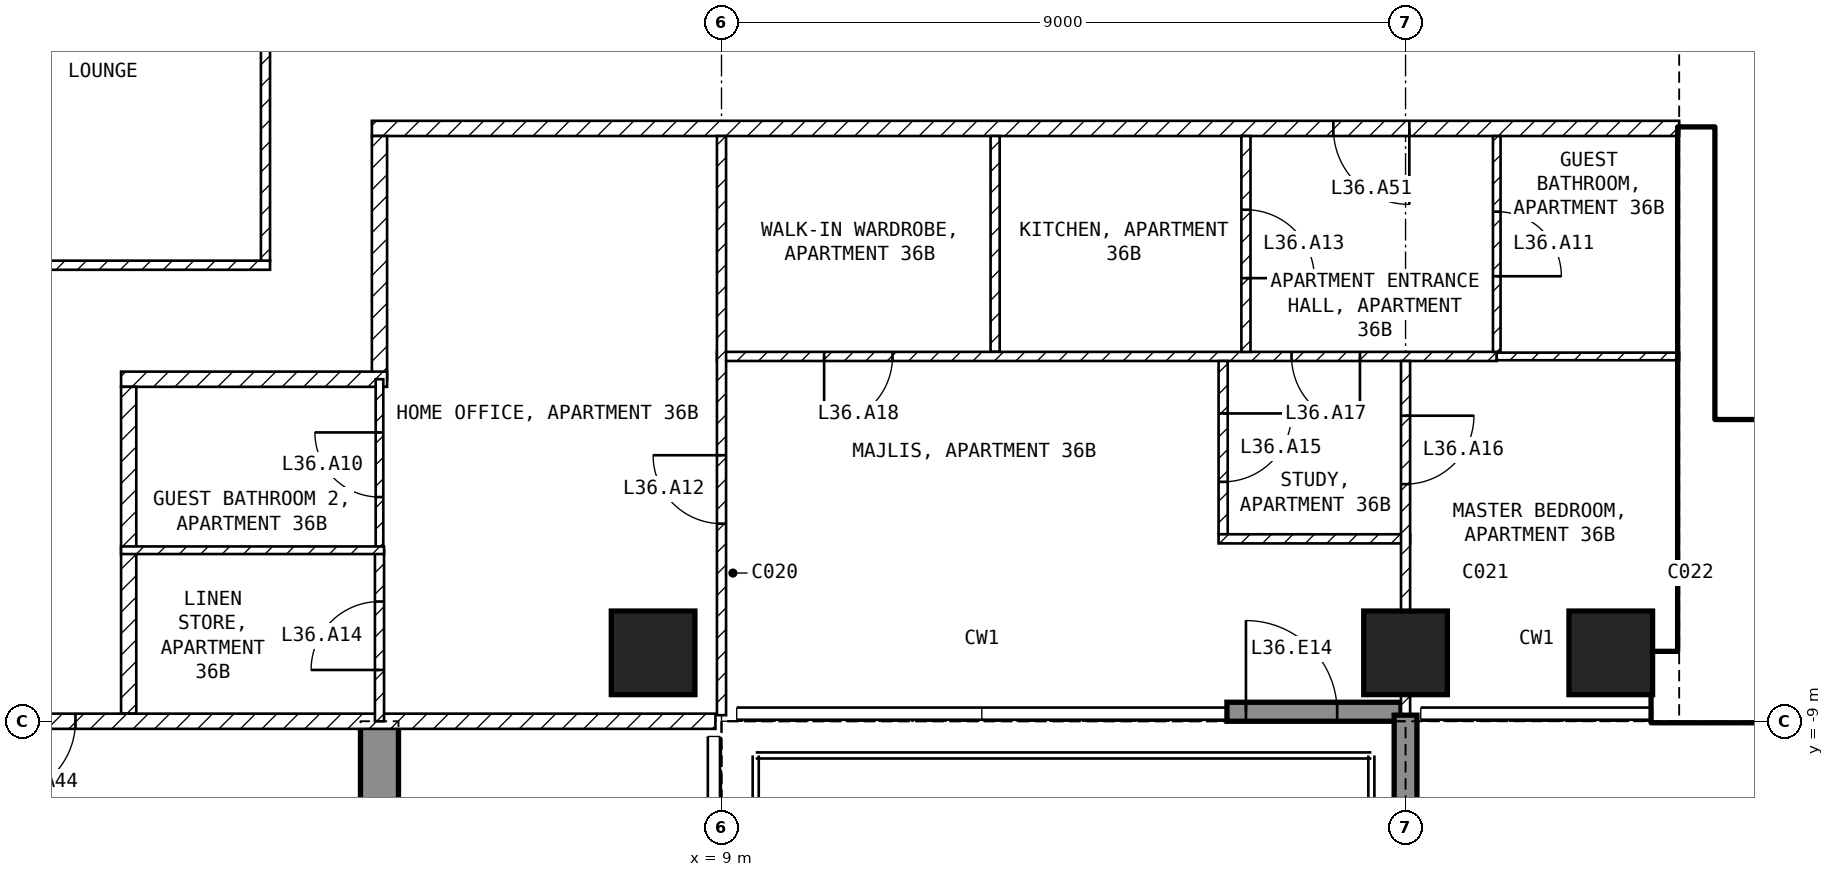
"""IFC4 building model, lengths in metres.
Left out: names, types, materials, properties, quantities, classifications, styles, units other than length and angle.
Written with IfcOpenShell. Run it as: python <this file> out.ifc"""

import sys

from ifc_helpers import new_model, si_unit, direction, frame, frame_2d, origin, origin_2d, place, context, subcontext, project, spatial, polyline, rectangle, outline, extrude, element, fill, save


model = new_model("IFC4")
c1 = context("Model", 3, precision=1e-05, world=origin(), true_north=direction((0.0, 1.0)))
c2 = subcontext(c1, "Body", "Model", "MODEL_VIEW")
j1 = project(units=[si_unit("LENGTHUNIT", "METRE"), si_unit("PLANEANGLEUNIT", "RADIAN")], contexts=[c1])
p1 = place(None, origin())
s1 = spatial("IfcSite", under=j1, at=p1, CompositionType="ELEMENT")
p2 = place(p1, origin())
s2 = spatial("IfcBuilding", under=s1, at=p2, CompositionType="ELEMENT")
p3 = place(p2, frame((0.0, 0.0, 147.9)))
s3 = spatial("IfcBuildingStorey", under=s2, at=p3, CompositionType="ELEMENT", Elevation=147.9)
for number, where, z_axis, x_axis in (
    (1, (8.1, -8.1, -0.25), (0.0, 0.0, 1.0), (1.0, 0.0, 0.0)),
    (2, (18.0, -8.1, -0.25), (0.0, 0.0, 1.0), (1.0, 0.0, 0.0)),
    (3, (20.7, -8.1, -0.25), (0.0, 0.0, 1.0), (1.0, 0.0, 0.0)),
):
    element("IfcColumn", number, at=place(p3, frame(where, z_axis=z_axis, x_axis=x_axis)), inside=s3, PredefinedType="COLUMN", context=c2, shape_type="SweptSolid", body=[
        extrude(rectangle(XDim=1.1, YDim=1.1, at=origin_2d()), origin(), (0.0, 0.0, 1.0), 3.5),
    ])
p4 = place(p3, frame((4.25, -20.15, -0.25), z_axis=(1.0, 0.0, 0.0), x_axis=(0.0, 1.0, 0.0)))
e4 = element("IfcWall", 4, at=p4, inside=s3, PredefinedType="SHEAR", context=c2, shape_type="SweptSolid", body=[
    extrude(outline(polyline([(0.0, 0.0), (6.65, 0.0), (6.65, 2.65), (9.05, 2.65), (9.05, 0.0), (11.15, 0.0), (11.15, 3.5), (0.0, 3.5), (0.0, 0.0)])), origin(), (0.0, 0.0, 1.0), 0.5),
])
p5 = place(p3, frame((15.65, -8.875, 0.0), z_axis=(0.0, 0.0, 1.0), x_axis=(1.0, 0.0, 0.0)))
e5 = element("IfcWall", 5, at=p5, inside=s3, PredefinedType="SOLIDWALL", context=c2, shape_type="SweptSolid", body=[
    extrude(rectangle(XDim=2.29, YDim=0.25, at=frame_2d((1.145, 0.0))), origin(), (0.0, 0.0, 1.0), 3.25),
])
p6 = place(p5, frame((0.25, 0.0, 0.0)))
e6 = element("IfcOpeningElement", 6, at=p6, cuts=e5, PredefinedType="OPENING", context=c2, shape_type="SweptSolid", body=[
    extrude(rectangle(XDim=1.2, YDim=2.4, at=frame_2d((0.6, 1.2))), frame((0.0, 0.135, 0.0), z_axis=(0.0, -1.0, 0.0), x_axis=(1.0, 0.0, 0.0)), (0.0, 0.0, 1.0), 0.27),
])
p7 = place(p3, frame((18.0, -8.92, 0.0), z_axis=(0.0, 0.0, 1.0), x_axis=(0.0, -1.0, 0.0)))
e7 = element("IfcWall", 7, at=p7, inside=s3, PredefinedType="SOLIDWALL", context=c2, shape_type="SweptSolid", body=[
    extrude(rectangle(XDim=2.82, YDim=0.3, at=frame_2d((1.41, 0.0))), origin(), (0.0, 0.0, 1.0), 3.25),
])
p8 = place(p3, frame((21.25, -8.55, 0.0), z_axis=(0.0, 0.0, 1.0), x_axis=(1.0, 0.0, 0.0)))
e8 = element("IfcWall", 8, at=p8, inside=s3, PredefinedType="SHEAR", context=c2, shape_type="SweptSolid", body=[
    extrude(rectangle(XDim=8.95, YDim=0.9, at=frame_2d((4.475, 0.0))), origin(), (0.0, 0.0, 1.0), 3.25),
])
p9 = place(p3, frame((21.825, -8.1, 0.0), z_axis=(0.0, 0.0, 1.0), x_axis=(0.0, 1.0, 0.0)))
e9 = element("IfcWall", 9, at=p9, inside=s3, PredefinedType="SHEAR", context=c2, shape_type="SweptSolid", body=[
    extrude(rectangle(XDim=6.9, YDim=0.45, at=frame_2d((3.45, 0.0))), origin(), (0.0, 0.0, 1.0), 3.25),
])
p10 = place(p3, frame((22.05, -5.15, 0.0), z_axis=(0.0, 0.0, 1.0), x_axis=(1.0, 0.0, 0.0)))
e10 = element("IfcWall", 10, at=p10, inside=s3, PredefinedType="SOLIDWALL", context=c2, shape_type="SweptSolid", body=[
    extrude(rectangle(XDim=6.3, YDim=0.2, at=frame_2d((3.15, 0.0))), origin(), (0.0, 0.0, 1.0), 3.25),
])
p11 = place(p10, frame((0.2, 0.0, 0.0)))
e11 = element("IfcOpeningElement", 11, at=p11, cuts=e10, PredefinedType="OPENING", context=c2, shape_type="SweptSolid", body=[
    extrude(rectangle(XDim=1.0, YDim=2.1, at=frame_2d((0.5, 1.05))), frame((0.0, 0.11, 0.0), z_axis=(0.0, -1.0, 0.0), x_axis=(1.0, 0.0, 0.0)), (0.0, 0.0, 1.0), 0.22),
])
p12 = place(p3, frame((-3.06, -3.0, 0.0), z_axis=(0.0, 0.0, 1.0), x_axis=(1.0, 0.0, 0.0)))
e12 = element("IfcWall", 12, at=p12, inside=s3, PredefinedType="PARTITIONING", context=c2, shape_type="SweptSolid", body=[
    extrude(rectangle(XDim=6.12, YDim=0.12, at=frame_2d((3.06, 0.0))), origin(), (0.0, 0.0, 1.0), 3.25),
])
p13 = place(p3, frame((3.0, -2.94, 0.0), z_axis=(0.0, 0.0, 1.0), x_axis=(0.0, 1.0, 0.0)))
e13 = element("IfcWall", 13, at=p13, inside=s3, PredefinedType="PARTITIONING", context=c2, shape_type="SweptSolid", body=[
    extrude(rectangle(XDim=5.88, YDim=0.12, at=frame_2d((2.94, 0.0))), origin(), (0.0, 0.0, 1.0), 3.25),
])
p14 = place(p3, frame((21.6, -1.2, 0.0), z_axis=(0.0, 0.0, 1.0), x_axis=(-1.0, 0.0, 0.0)))
e14 = element("IfcWall", 14, at=p14, inside=s3, PredefinedType="PARTITIONING", context=c2, shape_type="SweptSolid", body=[
    extrude(rectangle(XDim=17.2, YDim=0.2, at=frame_2d((8.6, 0.0))), origin(), (0.0, 0.0, 1.0), 3.25),
])
p15 = place(p14, frame((3.55, 0.0, 0.0)))
e15 = element("IfcOpeningElement", 15, at=p15, cuts=e14, PredefinedType="OPENING", context=c2, shape_type="SweptSolid", body=[
    extrude(rectangle(XDim=1.0, YDim=2.1, at=frame_2d((0.5, 1.05))), frame((0.0, 0.11, 0.0), z_axis=(0.0, -1.0, 0.0), x_axis=(1.0, 0.0, 0.0)), (0.0, 0.0, 1.0), 0.22),
])
p16 = place(p3, frame((4.5, -1.3, 0.0), z_axis=(0.0, 0.0, 1.0), x_axis=(0.0, -1.0, 0.0)))
e16 = element("IfcWall", 16, at=p16, inside=s3, PredefinedType="PARTITIONING", context=c2, shape_type="SweptSolid", body=[
    extrude(rectangle(XDim=3.2, YDim=0.2, at=frame_2d((1.6, 0.0))), origin(), (0.0, 0.0, 1.0), 3.25),
])
p17 = place(p3, frame((4.6, -4.5, 0.0), z_axis=(0.0, 0.0, 1.0), x_axis=(-1.0, 0.0, 0.0)))
e17 = element("IfcWall", 17, at=p17, inside=s3, PredefinedType="PARTITIONING", context=c2, shape_type="SweptSolid", body=[
    extrude(rectangle(XDim=3.5, YDim=0.2, at=frame_2d((1.75, 0.0))), origin(), (0.0, 0.0, 1.0), 3.25),
])
p18 = place(p3, frame((1.2, -4.6, 0.0), z_axis=(0.0, 0.0, 1.0), x_axis=(0.0, -1.0, 0.0)))
e18 = element("IfcWall", 18, at=p18, inside=s3, PredefinedType="PARTITIONING", context=c2, shape_type="SweptSolid", body=[
    extrude(rectangle(XDim=4.3, YDim=0.2, at=frame_2d((2.15, 0.0))), origin(), (0.0, 0.0, 1.0), 3.25),
])
p19 = place(p3, frame((8.92, -9.0, 0.0), z_axis=(0.0, 0.0, 1.0), x_axis=(-1.0, 0.0, 0.0)))
e19 = element("IfcWall", 19, at=p19, inside=s3, PredefinedType="PARTITIONING", context=c2, shape_type="SweptSolid", body=[
    extrude(rectangle(XDim=17.84, YDim=0.2, at=frame_2d((8.92, 0.0))), origin(), (0.0, 0.0, 1.0), 3.25),
])
p20 = place(p19, frame((8.42, 0.0, 0.0)))
e20 = element("IfcOpeningElement", 20, at=p20, cuts=e19, PredefinedType="OPENING", context=c2, shape_type="SweptSolid", body=[
    extrude(rectangle(XDim=1.0, YDim=2.1, at=frame_2d((0.5, 1.05))), frame((0.0, 0.11, 0.0), z_axis=(0.0, -1.0, 0.0), x_axis=(1.0, 0.0, 0.0)), (0.0, 0.0, 1.0), 0.22),
])
p21 = place(p3, frame((12.6, -1.3, 0.0), z_axis=(0.0, 0.0, 1.0), x_axis=(0.0, -1.0, 0.0)))
e21 = element("IfcWall", 21, at=p21, inside=s3, PredefinedType="PARTITIONING", context=c2, shape_type="SweptSolid", body=[
    extrude(rectangle(XDim=2.84, YDim=0.12, at=frame_2d((1.42, 0.0))), origin(), (0.0, 0.0, 1.0), 3.25),
])
p22 = place(p3, frame((19.2, -4.2, 0.0), z_axis=(0.0, 0.0, 1.0), x_axis=(-1.0, 0.0, 0.0)))
e22 = element("IfcWall", 22, at=p22, inside=s3, PredefinedType="PARTITIONING", context=c2, shape_type="SweptSolid", body=[
    extrude(rectangle(XDim=10.26, YDim=0.12, at=frame_2d((5.13, 0.0))), origin(), (0.0, 0.0, 1.0), 3.25),
])
p23 = place(p22, frame((1.8, 0.0, 0.0)))
e23 = element("IfcOpeningElement", 23, at=p23, cuts=e22, PredefinedType="OPENING", context=c2, shape_type="SweptSolid", body=[
    extrude(rectangle(XDim=0.9, YDim=2.1, at=frame_2d((0.45, 1.05))), frame((0.0, 0.07, 0.0), z_axis=(0.0, -1.0, 0.0), x_axis=(1.0, 0.0, 0.0)), (0.0, 0.0, 1.0), 0.14),
])
p24 = place(p22, frame((7.95, 0.0, 0.0)))
e24 = element("IfcOpeningElement", 24, at=p24, cuts=e22, PredefinedType="OPENING", context=c2, shape_type="SweptSolid", body=[
    extrude(rectangle(XDim=0.9, YDim=2.1, at=frame_2d((0.45, 1.05))), frame((0.0, 0.07, 0.0), z_axis=(0.0, -1.0, 0.0), x_axis=(1.0, 0.0, 0.0)), (0.0, 0.0, 1.0), 0.14),
])
p25 = place(p3, frame((9.0, -8.92, 0.0), z_axis=(0.0, 0.0, 1.0), x_axis=(0.0, 1.0, 0.0)))
e25 = element("IfcWall", 25, at=p25, inside=s3, PredefinedType="PARTITIONING", context=c2, shape_type="SweptSolid", body=[
    extrude(rectangle(XDim=7.62, YDim=0.12, at=frame_2d((3.81, 0.0))), origin(), (0.0, 0.0, 1.0), 3.25),
])
p26 = place(p25, frame((2.52, 0.0, 0.0)))
e26 = element("IfcOpeningElement", 26, at=p26, cuts=e25, PredefinedType="OPENING", context=c2, shape_type="SweptSolid", body=[
    extrude(rectangle(XDim=0.9, YDim=2.1, at=frame_2d((0.45, 1.05))), frame((0.0, 0.07, 0.0), z_axis=(0.0, -1.0, 0.0), x_axis=(1.0, 0.0, 0.0)), (0.0, 0.0, 1.0), 0.14),
])
p27 = place(p3, frame((15.9, -1.3, 0.0), z_axis=(0.0, 0.0, 1.0), x_axis=(0.0, -1.0, 0.0)))
e27 = element("IfcWall", 27, at=p27, inside=s3, PredefinedType="PARTITIONING", context=c2, shape_type="SweptSolid", body=[
    extrude(rectangle(XDim=2.84, YDim=0.12, at=frame_2d((1.42, 0.0))), origin(), (0.0, 0.0, 1.0), 3.25),
])
p28 = place(p27, frame((0.97, 0.0, 0.0)))
e28 = element("IfcOpeningElement", 28, at=p28, cuts=e27, PredefinedType="OPENING", context=c2, shape_type="SweptSolid", body=[
    extrude(rectangle(XDim=0.9, YDim=2.1, at=frame_2d((0.45, 1.05))), frame((0.0, 0.07, 0.0), z_axis=(0.0, -1.0, 0.0), x_axis=(1.0, 0.0, 0.0)), (0.0, 0.0, 1.0), 0.14),
])
p29 = place(p3, frame((19.2, -1.3, 0.0), z_axis=(0.0, 0.0, 1.0), x_axis=(0.0, -1.0, 0.0)))
e29 = element("IfcWall", 29, at=p29, inside=s3, PredefinedType="PARTITIONING", context=c2, shape_type="SweptSolid", body=[
    extrude(rectangle(XDim=2.84, YDim=0.1, at=frame_2d((1.42, 0.0))), origin(), (0.0, 0.0, 1.0), 3.25),
])
p30 = place(p29, frame((0.995, 0.0, 0.0)))
e30 = element("IfcOpeningElement", 30, at=p30, cuts=e29, PredefinedType="OPENING", context=c2, shape_type="SweptSolid", body=[
    extrude(rectangle(XDim=0.85, YDim=2.1, at=frame_2d((0.425, 1.05))), frame((0.0, 0.06, 0.0), z_axis=(0.0, -1.0, 0.0), x_axis=(1.0, 0.0, 0.0)), (0.0, 0.0, 1.0), 0.12),
])
p31 = place(p3, frame((21.6, -4.2, 0.0), z_axis=(0.0, 0.0, 1.0), x_axis=(-1.0, 0.0, 0.0)))
e31 = element("IfcWall", 31, at=p31, inside=s3, PredefinedType="PARTITIONING", context=c2, shape_type="SweptSolid", body=[
    extrude(rectangle(XDim=2.4, YDim=0.1, at=frame_2d((1.2, 0.0))), origin(), (0.0, 0.0, 1.0), 3.25),
])
p32 = place(p3, frame((15.6, -4.26, 0.0), z_axis=(0.0, 0.0, 1.0), x_axis=(0.0, -1.0, 0.0)))
e32 = element("IfcWall", 32, at=p32, inside=s3, PredefinedType="PARTITIONING", context=c2, shape_type="SweptSolid", body=[
    extrude(rectangle(XDim=2.28, YDim=0.12, at=frame_2d((1.14, 0.0))), origin(), (0.0, 0.0, 1.0), 3.25),
])
p33 = place(p32, frame((0.69, 0.0, 0.0)))
e33 = element("IfcOpeningElement", 33, at=p33, cuts=e32, PredefinedType="OPENING", context=c2, shape_type="SweptSolid", body=[
    extrude(rectangle(XDim=0.9, YDim=2.1, at=frame_2d((0.45, 1.05))), frame((0.0, 0.07, 0.0), z_axis=(0.0, -1.0, 0.0), x_axis=(1.0, 0.0, 0.0)), (0.0, 0.0, 1.0), 0.14),
])
p34 = place(p3, frame((15.54, -6.6, 0.0), z_axis=(0.0, 0.0, 1.0), x_axis=(1.0, 0.0, 0.0)))
e34 = element("IfcWall", 34, at=p34, inside=s3, PredefinedType="PARTITIONING", context=c2, shape_type="SweptSolid", body=[
    extrude(rectangle(XDim=2.52, YDim=0.12, at=frame_2d((1.26, 0.0))), origin(), (0.0, 0.0, 1.0), 3.25),
])
p35 = place(p3, frame((18.0, -4.26, 0.0), z_axis=(0.0, 0.0, 1.0), x_axis=(0.0, -1.0, 0.0)))
e35 = element("IfcWall", 35, at=p35, inside=s3, PredefinedType="PARTITIONING", context=c2, shape_type="SweptSolid", body=[
    extrude(rectangle(XDim=4.66, YDim=0.12, at=frame_2d((2.33, 0.0))), origin(), (0.0, 0.0, 1.0), 2.414),
])
p36 = place(p35, frame((0.72, 0.0, 0.0)))
e36 = element("IfcOpeningElement", 36, at=p36, cuts=e35, PredefinedType="OPENING", context=c2, shape_type="SweptSolid", body=[
    extrude(rectangle(XDim=0.9, YDim=2.1, at=frame_2d((0.45, 1.05))), frame((0.0, 0.07, 0.0), z_axis=(0.0, -1.0, 0.0), x_axis=(1.0, 0.0, 0.0)), (0.0, 0.0, 1.0), 0.14),
])
p37 = place(p3, frame((4.5, -6.75, 0.0), z_axis=(0.0, 0.0, 1.0), x_axis=(0.0, 1.0, 0.0)))
e37 = element("IfcWall", 37, at=p37, inside=s3, PredefinedType="PARTITIONING", context=c2, shape_type="SweptSolid", body=[
    extrude(rectangle(XDim=2.25, YDim=0.1, at=frame_2d((1.125, 0.0))), origin(), (0.0, 0.0, 1.0), 3.25),
])
p38 = place(p37, frame((0.7, 0.0, 0.0)))
e38 = element("IfcOpeningElement", 38, at=p38, cuts=e37, PredefinedType="OPENING", context=c2, shape_type="SweptSolid", body=[
    extrude(rectangle(XDim=0.85, YDim=2.1, at=frame_2d((0.425, 1.05))), frame((0.0, 0.06, 0.0), z_axis=(0.0, -1.0, 0.0), x_axis=(1.0, 0.0, 0.0)), (0.0, 0.0, 1.0), 0.12),
])
p39 = place(p3, frame((4.5, -9.0, 0.0), z_axis=(0.0, 0.0, 1.0), x_axis=(0.0, 1.0, 0.0)))
e39 = element("IfcWall", 39, at=p39, inside=s3, PredefinedType="PARTITIONING", context=c2, shape_type="SweptSolid", body=[
    extrude(rectangle(XDim=2.25, YDim=0.12, at=frame_2d((1.125, 0.0))), origin(), (0.0, 0.0, 1.0), 3.25),
])
p40 = place(p39, frame((0.675, 0.0, 0.0)))
e40 = element("IfcOpeningElement", 40, at=p40, cuts=e39, PredefinedType="OPENING", context=c2, shape_type="SweptSolid", body=[
    extrude(rectangle(XDim=0.9, YDim=2.1, at=frame_2d((0.45, 1.05))), frame((0.0, 0.07, 0.0), z_axis=(0.0, -1.0, 0.0), x_axis=(1.0, 0.0, 0.0)), (0.0, 0.0, 1.0), 0.14),
])
p41 = place(p3, frame((4.56, -6.75, 0.0), z_axis=(0.0, 0.0, 1.0), x_axis=(-1.0, 0.0, 0.0)))
e41 = element("IfcWall", 41, at=p41, inside=s3, PredefinedType="PARTITIONING", context=c2, shape_type="SweptSolid", body=[
    extrude(rectangle(XDim=3.46, YDim=0.1, at=frame_2d((1.73, 0.0))), origin(), (0.0, 0.0, 1.0), 3.25),
])
p42 = place(p6, origin())
e42 = element("IfcDoor", 42, at=p42, inside=s3, OperationType="SINGLE_SWING_LEFT", PredefinedType="DOOR", context=c2, shape_type="SweptSolid", body=[
    extrude(rectangle(XDim=1.2, YDim=2.4, at=frame_2d((0.6, 1.2))), frame((0.0, 0.025, 0.0), z_axis=(0.0, -1.0, 0.0), x_axis=(1.0, 0.0, 0.0)), (0.0, 0.0, 1.0), 0.05),
])
fill(e6, e42)
p43 = place(p11, origin())
e43 = element("IfcDoor", 43, at=p43, inside=s3, OperationType="SINGLE_SWING_LEFT", PredefinedType="DOOR", context=c2, shape_type="SweptSolid", body=[
    extrude(rectangle(XDim=1.0, YDim=2.1, at=frame_2d((0.5, 1.05))), frame((0.0, 0.025, 0.0), z_axis=(0.0, -1.0, 0.0), x_axis=(1.0, 0.0, 0.0)), (0.0, 0.0, 1.0), 0.05),
])
fill(e11, e43)
p44 = place(p38, origin())
e44 = element("IfcDoor", 44, at=p44, inside=s3, OperationType="SINGLE_SWING_RIGHT", PredefinedType="DOOR", context=c2, shape_type="SweptSolid", body=[
    extrude(rectangle(XDim=0.85, YDim=2.1, at=frame_2d((0.425, 1.05))), frame((0.0, 0.025, 0.0), z_axis=(0.0, -1.0, 0.0), x_axis=(1.0, 0.0, 0.0)), (0.0, 0.0, 1.0), 0.05),
])
fill(e38, e44)
p45 = place(p30, origin())
e45 = element("IfcDoor", 45, at=p45, inside=s3, OperationType="SINGLE_SWING_RIGHT", PredefinedType="DOOR", context=c2, shape_type="SweptSolid", body=[
    extrude(rectangle(XDim=0.85, YDim=2.1, at=frame_2d((0.425, 1.05))), frame((0.0, 0.025, 0.0), z_axis=(0.0, -1.0, 0.0), x_axis=(1.0, 0.0, 0.0)), (0.0, 0.0, 1.0), 0.05),
])
fill(e30, e45)
p46 = place(p26, origin())
e46 = element("IfcDoor", 46, at=p46, inside=s3, OperationType="SINGLE_SWING_RIGHT", PredefinedType="DOOR", context=c2, shape_type="SweptSolid", body=[
    extrude(rectangle(XDim=0.9, YDim=2.1, at=frame_2d((0.45, 1.05))), frame((0.0, 0.025, 0.0), z_axis=(0.0, -1.0, 0.0), x_axis=(1.0, 0.0, 0.0)), (0.0, 0.0, 1.0), 0.05),
])
fill(e26, e46)
p47 = place(p28, origin())
e47 = element("IfcDoor", 47, at=p47, inside=s3, OperationType="SINGLE_SWING_RIGHT", PredefinedType="DOOR", context=c2, shape_type="SweptSolid", body=[
    extrude(rectangle(XDim=0.9, YDim=2.1, at=frame_2d((0.45, 1.05))), frame((0.0, 0.025, 0.0), z_axis=(0.0, -1.0, 0.0), x_axis=(1.0, 0.0, 0.0)), (0.0, 0.0, 1.0), 0.05),
])
fill(e28, e47)
p48 = place(p40, origin())
e48 = element("IfcDoor", 48, at=p48, inside=s3, OperationType="SINGLE_SWING_LEFT", PredefinedType="DOOR", context=c2, shape_type="SweptSolid", body=[
    extrude(rectangle(XDim=0.9, YDim=2.1, at=frame_2d((0.45, 1.05))), frame((0.0, 0.025, 0.0), z_axis=(0.0, -1.0, 0.0), x_axis=(1.0, 0.0, 0.0)), (0.0, 0.0, 1.0), 0.05),
])
fill(e40, e48)
p49 = place(p33, origin())
e49 = element("IfcDoor", 49, at=p49, inside=s3, OperationType="SINGLE_SWING_LEFT", PredefinedType="DOOR", context=c2, shape_type="SweptSolid", body=[
    extrude(rectangle(XDim=0.9, YDim=2.1, at=frame_2d((0.45, 1.05))), frame((0.0, 0.025, 0.0), z_axis=(0.0, -1.0, 0.0), x_axis=(1.0, 0.0, 0.0)), (0.0, 0.0, 1.0), 0.05),
])
fill(e33, e49)
p50 = place(p36, origin())
e50 = element("IfcDoor", 50, at=p50, inside=s3, OperationType="SINGLE_SWING_LEFT", PredefinedType="DOOR", context=c2, shape_type="SweptSolid", body=[
    extrude(rectangle(XDim=0.9, YDim=2.1, at=frame_2d((0.45, 1.05))), frame((0.0, 0.025, 0.0), z_axis=(0.0, -1.0, 0.0), x_axis=(1.0, 0.0, 0.0)), (0.0, 0.0, 1.0), 0.05),
])
fill(e36, e50)
p51 = place(p23, origin())
e51 = element("IfcDoor", 51, at=p51, inside=s3, OperationType="SINGLE_SWING_LEFT", PredefinedType="DOOR", context=c2, shape_type="SweptSolid", body=[
    extrude(rectangle(XDim=0.9, YDim=2.1, at=frame_2d((0.45, 1.05))), frame((0.0, 0.025, 0.0), z_axis=(0.0, -1.0, 0.0), x_axis=(1.0, 0.0, 0.0)), (0.0, 0.0, 1.0), 0.05),
])
fill(e23, e51)
p52 = place(p24, origin())
e52 = element("IfcDoor", 52, at=p52, inside=s3, OperationType="SINGLE_SWING_RIGHT", PredefinedType="DOOR", context=c2, shape_type="SweptSolid", body=[
    extrude(rectangle(XDim=0.9, YDim=2.1, at=frame_2d((0.45, 1.05))), frame((0.0, 0.025, 0.0), z_axis=(0.0, -1.0, 0.0), x_axis=(1.0, 0.0, 0.0)), (0.0, 0.0, 1.0), 0.05),
])
fill(e24, e52)
p53 = place(p20, origin())
e53 = element("IfcDoor", 53, at=p53, inside=s3, OperationType="SINGLE_SWING_RIGHT", PredefinedType="DOOR", context=c2, shape_type="SweptSolid", body=[
    extrude(rectangle(XDim=1.0, YDim=2.1, at=frame_2d((0.5, 1.05))), frame((0.0, 0.025, 0.0), z_axis=(0.0, -1.0, 0.0), x_axis=(1.0, 0.0, 0.0)), (0.0, 0.0, 1.0), 0.05),
])
fill(e20, e53)
p54 = place(p15, origin())
e54 = element("IfcDoor", 54, at=p54, inside=s3, OperationType="SINGLE_SWING_LEFT", PredefinedType="DOOR", context=c2, shape_type="SweptSolid", body=[
    extrude(rectangle(XDim=1.0, YDim=2.1, at=frame_2d((0.5, 1.05))), frame((0.0, 0.025, 0.0), z_axis=(0.0, -1.0, 0.0), x_axis=(1.0, 0.0, 0.0)), (0.0, 0.0, 1.0), 0.05),
])
fill(e15, e54)
save(model, sys.argv[1])
